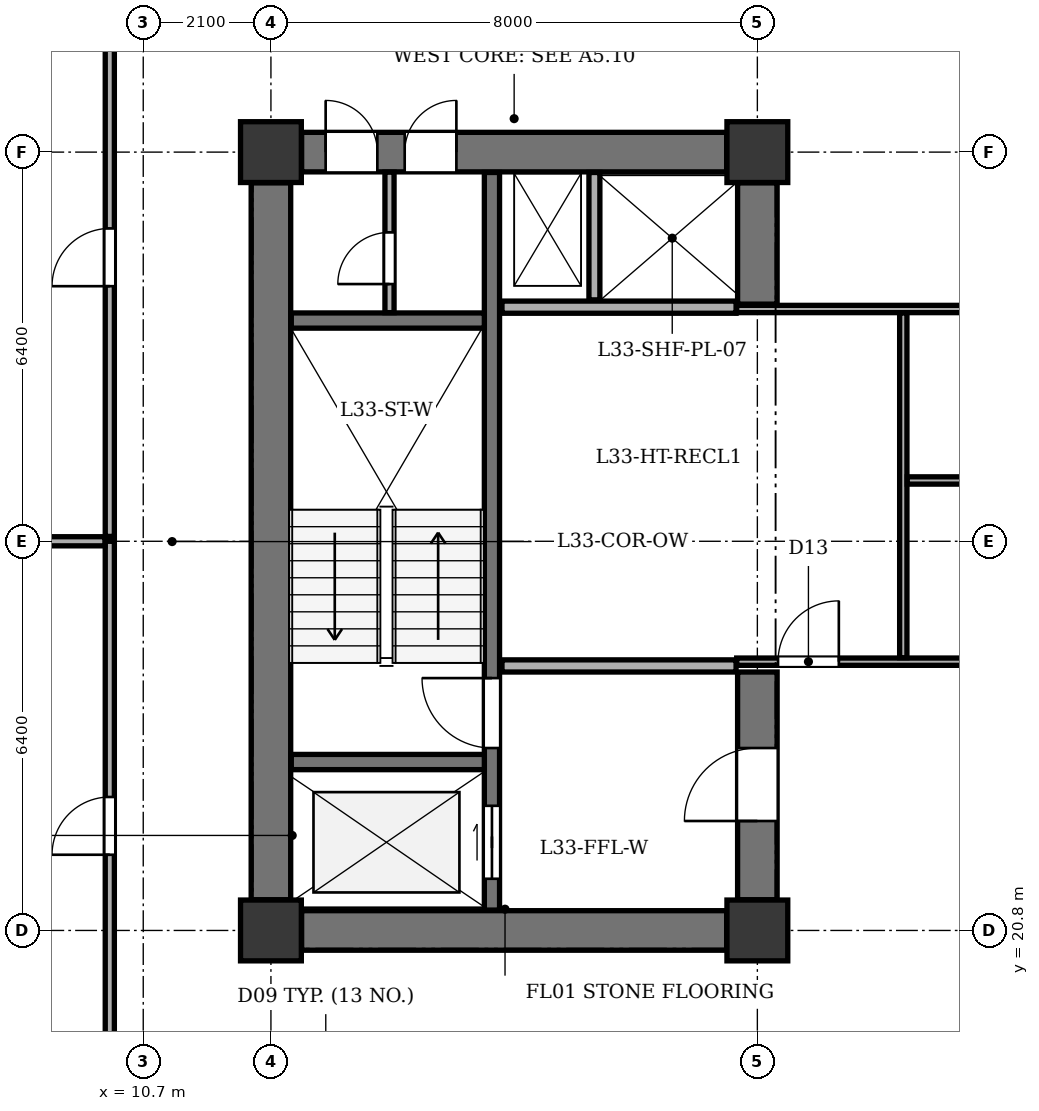
"""IFC4 building model, lengths in metres.
Left out: names, types, materials, properties, quantities, classifications, styles, units other than length and angle.
Written with IfcOpenShell. Run it as: python <this file> out.ifc"""

import sys

from ifc_helpers import new_model, si_unit, direction, frame, frame_2d, origin, origin_2d, place, context, subcontext, project, spatial, rectangle, extrude, element, fill, save


model = new_model("IFC4")
c1 = context("Model", 3, precision=1e-05, world=origin(), true_north=direction((0.0, 1.0)))
c2 = subcontext(c1, "Body", "Model", "MODEL_VIEW")
j1 = project(units=[si_unit("LENGTHUNIT", "METRE"), si_unit("PLANEANGLEUNIT", "RADIAN")], contexts=[c1])
p1 = place(None, origin())
s1 = spatial("IfcSite", under=j1, at=p1, CompositionType="ELEMENT")
p2 = place(p1, origin())
s2 = spatial("IfcBuilding", under=s1, at=p2, CompositionType="ELEMENT")
p3 = place(p2, frame((0.0, 0.0, 134.3)))
s3 = spatial("IfcBuildingStorey", under=s2, at=p3, CompositionType="ELEMENT", Elevation=134.3)
for number, where, z_axis, x_axis in (
    (1, (12.8, 20.8, 0.0), (0.0, 0.0, 1.0), (1.0, 0.0, 0.0)),
    (2, (20.8, 20.8, 0.0), (0.0, 0.0, 1.0), (1.0, 0.0, 0.0)),
    (3, (12.8, 33.6, 0.0), (0.0, 0.0, 1.0), (1.0, 0.0, 0.0)),
    (4, (20.8, 33.6, 0.0), (0.0, 0.0, 1.0), (1.0, 0.0, 0.0)),
):
    element("IfcColumn", number, at=place(p3, frame(where, z_axis=z_axis, x_axis=x_axis)), inside=s3, PredefinedType="COLUMN", context=c2, shape_type="SweptSolid", body=[
        extrude(rectangle(XDim=1.0, YDim=1.0, at=origin_2d()), origin(), (0.0, 0.0, 1.0), 3.5),
    ])
p4 = place(p3, frame((12.8, 21.305, 0.0), z_axis=(0.0, 0.0, 1.0), x_axis=(0.0, 1.0, 0.0)))
e5 = element("IfcWall", 5, at=p4, inside=s3, PredefinedType="SHEAR", context=c2, shape_type="SweptSolid", body=[
    extrude(rectangle(XDim=11.79, YDim=0.65, at=frame_2d((5.895, 0.0))), origin(), (0.0, 0.0, 1.0), 3.2),
])
p5 = place(p3, frame((13.305, 20.8, 0.0), z_axis=(0.0, 0.0, 1.0), x_axis=(1.0, 0.0, 0.0)))
e6 = element("IfcWall", 6, at=p5, inside=s3, PredefinedType="SHEAR", context=c2, shape_type="SweptSolid", body=[
    extrude(rectangle(XDim=6.99, YDim=0.65, at=frame_2d((3.495, 0.0))), origin(), (0.0, 0.0, 1.0), 3.2),
])
p6 = place(p3, frame((13.305, 33.6, 0.0), z_axis=(0.0, 0.0, 1.0), x_axis=(1.0, 0.0, 0.0)))
e7 = element("IfcWall", 7, at=p6, inside=s3, PredefinedType="SHEAR", context=c2, shape_type="SweptSolid", body=[
    extrude(rectangle(XDim=6.99, YDim=0.65, at=frame_2d((3.495, 0.0))), origin(), (0.0, 0.0, 1.0), 3.2),
])
p7 = place(p6, frame((0.395, 0.0, 0.0)))
e8 = element("IfcOpeningElement", 8, at=p7, cuts=e7, PredefinedType="OPENING", context=c2, shape_type="SweptSolid", body=[
    extrude(rectangle(XDim=0.85, YDim=2.02, at=frame_2d((0.425, 1.01))), frame((0.0, 0.335, 0.0), z_axis=(0.0, -1.0, 0.0), x_axis=(1.0, 0.0, 0.0)), (0.0, 0.0, 1.0), 0.67),
])
p8 = place(p6, frame((1.695, 0.0, 0.0)))
e9 = element("IfcOpeningElement", 9, at=p8, cuts=e7, PredefinedType="OPENING", context=c2, shape_type="SweptSolid", body=[
    extrude(rectangle(XDim=0.85, YDim=2.02, at=frame_2d((0.425, 1.01))), frame((0.0, 0.335, 0.0), z_axis=(0.0, -1.0, 0.0), x_axis=(1.0, 0.0, 0.0)), (0.0, 0.0, 1.0), 0.67),
])
p9 = place(p3, frame((20.8, 21.305, 0.0), z_axis=(0.0, 0.0, 1.0), x_axis=(0.0, 1.0, 0.0)))
e10 = element("IfcWall", 10, at=p9, inside=s3, PredefinedType="SHEAR", context=c2, shape_type="SweptSolid", body=[
    extrude(rectangle(XDim=3.745, YDim=0.65, at=frame_2d((1.873, 0.0))), origin(), (0.0, 0.0, 1.0), 3.2),
])
p10 = place(p9, frame((1.295, 0.0, 0.0)))
e11 = element("IfcOpeningElement", 11, at=p10, cuts=e10, PredefinedType="OPENING", context=c2, shape_type="SweptSolid", body=[
    extrude(rectangle(XDim=1.2, YDim=2.15, at=frame_2d((0.6, 1.075))), frame((0.0, 0.335, 0.0), z_axis=(0.0, -1.0, 0.0), x_axis=(1.0, 0.0, 0.0)), (0.0, 0.0, 1.0), 0.67),
])
p11 = place(p3, frame((20.8, 31.1, 0.0), z_axis=(0.0, 0.0, 1.0), x_axis=(0.0, 1.0, 0.0)))
e12 = element("IfcWall", 12, at=p11, inside=s3, PredefinedType="SHEAR", context=c2, shape_type="SweptSolid", body=[
    extrude(rectangle(XDim=1.995, YDim=0.65, at=frame_2d((0.998, 0.0))), origin(), (0.0, 0.0, 1.0), 3.2),
])
p12 = place(p3, frame((16.435, 21.135, 0.0), z_axis=(0.0, 0.0, 1.0), x_axis=(0.0, 1.0, 0.0)))
e13 = element("IfcWall", 13, at=p12, inside=s3, PredefinedType="SHEAR", context=c2, shape_type="SweptSolid", body=[
    extrude(rectangle(XDim=12.13, YDim=0.25, at=frame_2d((6.065, 0.0))), origin(), (0.0, 0.0, 1.0), 3.2),
])
p13 = place(p12, frame((0.515, 0.0, 0.0)))
e14 = element("IfcOpeningElement", 14, at=p13, cuts=e13, PredefinedType="OPENING", context=c2, shape_type="SweptSolid", body=[
    extrude(rectangle(XDim=1.2, YDim=2.15, at=frame_2d((0.6, 1.075))), frame((0.0, 0.135, 0.0), z_axis=(0.0, -1.0, 0.0), x_axis=(1.0, 0.0, 0.0)), (0.0, 0.0, 1.0), 0.27),
])
p14 = place(p12, frame((2.665, 0.0, 0.0)))
e15 = element("IfcOpeningElement", 15, at=p14, cuts=e13, PredefinedType="OPENING", context=c2, shape_type="SweptSolid", body=[
    extrude(rectangle(XDim=1.15, YDim=2.15, at=frame_2d((0.575, 1.075))), frame((0.0, 0.135, 0.0), z_axis=(0.0, -1.0, 0.0), x_axis=(1.0, 0.0, 0.0)), (0.0, 0.0, 1.0), 0.27),
])
for number, where, z_axis, x_axis in (
    (16, (13.135, 23.57, 0.0), (0.0, 0.0, 1.0), (1.0, 0.0, 0.0)),
    (17, (13.135, 30.83, 0.0), (0.0, 0.0, 1.0), (1.0, 0.0, 0.0)),
):
    element("IfcWall", number, at=place(p3, frame(where, z_axis=z_axis, x_axis=x_axis)), inside=s3, PredefinedType="SHEAR", context=c2, shape_type="SweptSolid", body=[
        extrude(rectangle(XDim=3.175, YDim=0.25, at=frame_2d((1.587, 0.0))), origin(), (0.0, 0.0, 1.0), 3.2),
    ])
for number, where, z_axis, x_axis in (
    (18, (16.6, 25.15, 0.0), (0.0, 0.0, 1.0), (1.0, 0.0, 0.0)),
    (19, (16.6, 31.05, 0.0), (0.0, 0.0, 1.0), (1.0, 0.0, 0.0)),
):
    element("IfcWall", number, at=place(p3, frame(where, z_axis=z_axis, x_axis=x_axis)), inside=s3, PredefinedType="SOLIDWALL", context=c2, shape_type="SweptSolid", body=[
        extrude(rectangle(XDim=3.85, YDim=0.2, at=frame_2d((1.925, 0.0))), origin(), (0.0, 0.0, 1.0), 3.2),
    ])
p15 = place(p3, frame((18.12, 31.17, 0.0), z_axis=(0.0, 0.0, 1.0), x_axis=(0.0, 1.0, 0.0)))
e20 = element("IfcWall", 20, at=p15, inside=s3, PredefinedType="PARTITIONING", context=c2, shape_type="SweptSolid", body=[
    extrude(rectangle(XDim=2.095, YDim=0.18, at=frame_2d((1.047, 0.0))), origin(), (0.0, 0.0, 1.0), 3.2),
])
p16 = place(p3, frame((14.75, 30.96, 0.0), z_axis=(0.0, 0.0, 1.0), x_axis=(0.0, 1.0, 0.0)))
e21 = element("IfcWall", 21, at=p16, inside=s3, PredefinedType="PARTITIONING", context=c2, shape_type="SweptSolid", body=[
    extrude(rectangle(XDim=2.31, YDim=0.15, at=frame_2d((1.155, 0.0))), origin(), (0.0, 0.0, 1.0), 3.2),
])
p17 = place(p16, frame((0.47, 0.0, 0.0)))
e22 = element("IfcOpeningElement", 22, at=p17, cuts=e21, PredefinedType="OPENING", context=c2, shape_type="SweptSolid", body=[
    extrude(rectangle(XDim=0.85, YDim=2.02, at=frame_2d((0.425, 1.01))), frame((0.0, 0.085, 0.0), z_axis=(0.0, -1.0, 0.0), x_axis=(1.0, 0.0, 0.0)), (0.0, 0.0, 1.0), 0.17),
])
p18 = place(p3, frame((20.46, 25.22, 0.0), z_axis=(0.0, 0.0, 1.0), x_axis=(1.0, 0.0, 0.0)))
e23 = element("IfcWall", 23, at=p18, inside=s3, PredefinedType="PARTITIONING", context=c2, shape_type="SweptSolid", body=[
    extrude(rectangle(XDim=11.94, YDim=0.12, at=frame_2d((5.97, 0.0))), origin(), (0.0, 0.0, 1.0), 3.2),
])
p19 = place(p18, frame((0.68, 0.0, 0.0)))
e24 = element("IfcOpeningElement", 24, at=p19, cuts=e23, PredefinedType="OPENING", context=c2, shape_type="SweptSolid", body=[
    extrude(rectangle(XDim=1.0, YDim=2.1, at=frame_2d((0.5, 1.05))), frame((0.0, 0.07, 0.0), z_axis=(0.0, -1.0, 0.0), x_axis=(1.0, 0.0, 0.0)), (0.0, 0.0, 1.0), 0.14),
])
p20 = place(p3, frame((20.46, 31.02, 0.0), z_axis=(0.0, 0.0, 1.0), x_axis=(1.0, 0.0, 0.0)))
e25 = element("IfcWall", 25, at=p20, inside=s3, PredefinedType="PARTITIONING", context=c2, shape_type="SweptSolid", body=[
    extrude(rectangle(XDim=11.94, YDim=0.12, at=frame_2d((5.97, 0.0))), origin(), (0.0, 0.0, 1.0), 3.2),
])
p21 = place(p3, frame((23.2, 25.285, 0.0), z_axis=(0.0, 0.0, 1.0), x_axis=(0.0, 1.0, 0.0)))
e26 = element("IfcWall", 26, at=p21, inside=s3, PredefinedType="PARTITIONING", context=c2, shape_type="SweptSolid", body=[
    extrude(rectangle(XDim=5.67, YDim=0.12, at=frame_2d((2.835, 0.0))), origin(), (0.0, 0.0, 1.0), 3.2),
])
p22 = place(p3, frame((23.265, 28.2, 0.0), z_axis=(0.0, 0.0, 1.0), x_axis=(1.0, 0.0, 0.0)))
e27 = element("IfcWall", 27, at=p22, inside=s3, PredefinedType="PARTITIONING", context=c2, shape_type="SweptSolid", body=[
    extrude(rectangle(XDim=9.07, YDim=0.12, at=frame_2d((4.535, 0.0))), origin(), (0.0, 0.0, 1.0), 3.2),
])
p23 = place(p3, frame((10.15, 17.93, 0.0), z_axis=(0.0, 0.0, 1.0), x_axis=(0.0, 1.0, 0.0)))
e28 = element("IfcWall", 28, at=p23, inside=s3, PredefinedType="PARTITIONING", context=c2, shape_type="SweptSolid", body=[
    extrude(rectangle(XDim=9.27, YDim=0.15, at=frame_2d((4.635, 0.0))), origin(), (0.0, 0.0, 1.0), 3.2),
])
p24 = place(p23, frame((4.115, 0.0, 0.0)))
e29 = element("IfcOpeningElement", 29, at=p24, cuts=e28, PredefinedType="OPENING", context=c2, shape_type="SweptSolid", body=[
    extrude(rectangle(XDim=0.95, YDim=2.1, at=frame_2d((0.475, 1.05))), frame((0.0, 0.085, 0.0), z_axis=(0.0, -1.0, 0.0), x_axis=(1.0, 0.0, 0.0)), (0.0, 0.0, 1.0), 0.17),
])
p25 = place(p3, frame((4.675, 27.2, 0.0), z_axis=(0.0, 0.0, 1.0), x_axis=(1.0, 0.0, 0.0)))
e30 = element("IfcWall", 30, at=p25, inside=s3, PredefinedType="PARTITIONING", context=c2, shape_type="SweptSolid", body=[
    extrude(rectangle(XDim=5.395, YDim=0.15, at=frame_2d((2.698, 0.0))), origin(), (0.0, 0.0, 1.0), 3.2),
])
p26 = place(p3, frame((10.15, 27.28, 0.0), z_axis=(0.0, 0.0, 1.0), x_axis=(0.0, 1.0, 0.0)))
e31 = element("IfcWall", 31, at=p26, inside=s3, PredefinedType="PARTITIONING", context=c2, shape_type="SweptSolid", body=[
    extrude(rectangle(XDim=9.19, YDim=0.15, at=frame_2d((4.595, 0.0))), origin(), (0.0, 0.0, 1.0), 3.2),
])
p27 = place(p26, frame((4.115, 0.0, 0.0)))
e32 = element("IfcOpeningElement", 32, at=p27, cuts=e31, PredefinedType="OPENING", context=c2, shape_type="SweptSolid", body=[
    extrude(rectangle(XDim=0.95, YDim=2.1, at=frame_2d((0.475, 1.05))), frame((0.0, 0.085, 0.0), z_axis=(0.0, -1.0, 0.0), x_axis=(1.0, 0.0, 0.0)), (0.0, 0.0, 1.0), 0.17),
])
p28 = place(p7, origin())
e33 = element("IfcDoor", 33, at=p28, inside=s3, OperationType="SINGLE_SWING_LEFT", PredefinedType="DOOR", context=c2, shape_type="SweptSolid", body=[
    extrude(rectangle(XDim=0.85, YDim=2.02, at=frame_2d((0.425, 1.01))), frame((0.0, 0.025, 0.0), z_axis=(0.0, -1.0, 0.0), x_axis=(1.0, 0.0, 0.0)), (0.0, 0.0, 1.0), 0.05),
])
fill(e8, e33)
p29 = place(p8, origin())
e34 = element("IfcDoor", 34, at=p29, inside=s3, OperationType="SINGLE_SWING_RIGHT", PredefinedType="DOOR", context=c2, shape_type="SweptSolid", body=[
    extrude(rectangle(XDim=0.85, YDim=2.02, at=frame_2d((0.425, 1.01))), frame((0.0, 0.025, 0.0), z_axis=(0.0, -1.0, 0.0), x_axis=(1.0, 0.0, 0.0)), (0.0, 0.0, 1.0), 0.05),
])
fill(e9, e34)
p30 = place(p10, origin())
e35 = element("IfcDoor", 35, at=p30, inside=s3, OperationType="SINGLE_SWING_LEFT", PredefinedType="DOOR", context=c2, shape_type="SweptSolid", body=[
    extrude(rectangle(XDim=1.2, YDim=2.15, at=frame_2d((0.6, 1.075))), frame((0.0, 0.025, 0.0), z_axis=(0.0, -1.0, 0.0), x_axis=(1.0, 0.0, 0.0)), (0.0, 0.0, 1.0), 0.05),
])
fill(e11, e35)
p31 = place(p13, origin())
e36 = element("IfcDoor", 36, at=p31, inside=s3, OperationType="DOUBLE_DOOR_SLIDING", PredefinedType="DOOR", context=c2, shape_type="SweptSolid", body=[
    extrude(rectangle(XDim=1.2, YDim=2.15, at=frame_2d((0.6, 1.075))), frame((0.0, 0.025, 0.0), z_axis=(0.0, -1.0, 0.0), x_axis=(1.0, 0.0, 0.0)), (0.0, 0.0, 1.0), 0.05),
])
fill(e14, e36)
p32 = place(p14, origin())
e37 = element("IfcDoor", 37, at=p32, inside=s3, OperationType="SINGLE_SWING_RIGHT", PredefinedType="DOOR", context=c2, shape_type="SweptSolid", body=[
    extrude(rectangle(XDim=1.15, YDim=2.15, at=frame_2d((0.575, 1.075))), frame((0.0, 0.025, 0.0), z_axis=(0.0, -1.0, 0.0), x_axis=(1.0, 0.0, 0.0)), (0.0, 0.0, 1.0), 0.05),
])
fill(e15, e37)
p33 = place(p17, origin())
e38 = element("IfcDoor", 38, at=p33, inside=s3, OperationType="SINGLE_SWING_LEFT", PredefinedType="DOOR", context=c2, shape_type="SweptSolid", body=[
    extrude(rectangle(XDim=0.85, YDim=2.02, at=frame_2d((0.425, 1.01))), frame((0.0, 0.025, 0.0), z_axis=(0.0, -1.0, 0.0), x_axis=(1.0, 0.0, 0.0)), (0.0, 0.0, 1.0), 0.05),
])
fill(e22, e38)
p34 = place(p19, origin())
e39 = element("IfcDoor", 39, at=p34, inside=s3, OperationType="SINGLE_SWING_RIGHT", PredefinedType="DOOR", context=c2, shape_type="SweptSolid", body=[
    extrude(rectangle(XDim=1.0, YDim=2.1, at=frame_2d((0.5, 1.05))), frame((0.0, 0.025, 0.0), z_axis=(0.0, -1.0, 0.0), x_axis=(1.0, 0.0, 0.0)), (0.0, 0.0, 1.0), 0.05),
])
fill(e24, e39)
p35 = place(p24, origin())
e40 = element("IfcDoor", 40, at=p35, inside=s3, OperationType="SINGLE_SWING_LEFT", PredefinedType="DOOR", context=c2, shape_type="SweptSolid", body=[
    extrude(rectangle(XDim=0.95, YDim=2.1, at=frame_2d((0.475, 1.05))), frame((0.0, 0.025, 0.0), z_axis=(0.0, -1.0, 0.0), x_axis=(1.0, 0.0, 0.0)), (0.0, 0.0, 1.0), 0.05),
])
fill(e29, e40)
p36 = place(p27, origin())
e41 = element("IfcDoor", 41, at=p36, inside=s3, OperationType="SINGLE_SWING_LEFT", PredefinedType="DOOR", context=c2, shape_type="SweptSolid", body=[
    extrude(rectangle(XDim=0.95, YDim=2.1, at=frame_2d((0.475, 1.05))), frame((0.0, 0.025, 0.0), z_axis=(0.0, -1.0, 0.0), x_axis=(1.0, 0.0, 0.0)), (0.0, 0.0, 1.0), 0.05),
])
fill(e32, e41)
save(model, sys.argv[1])
